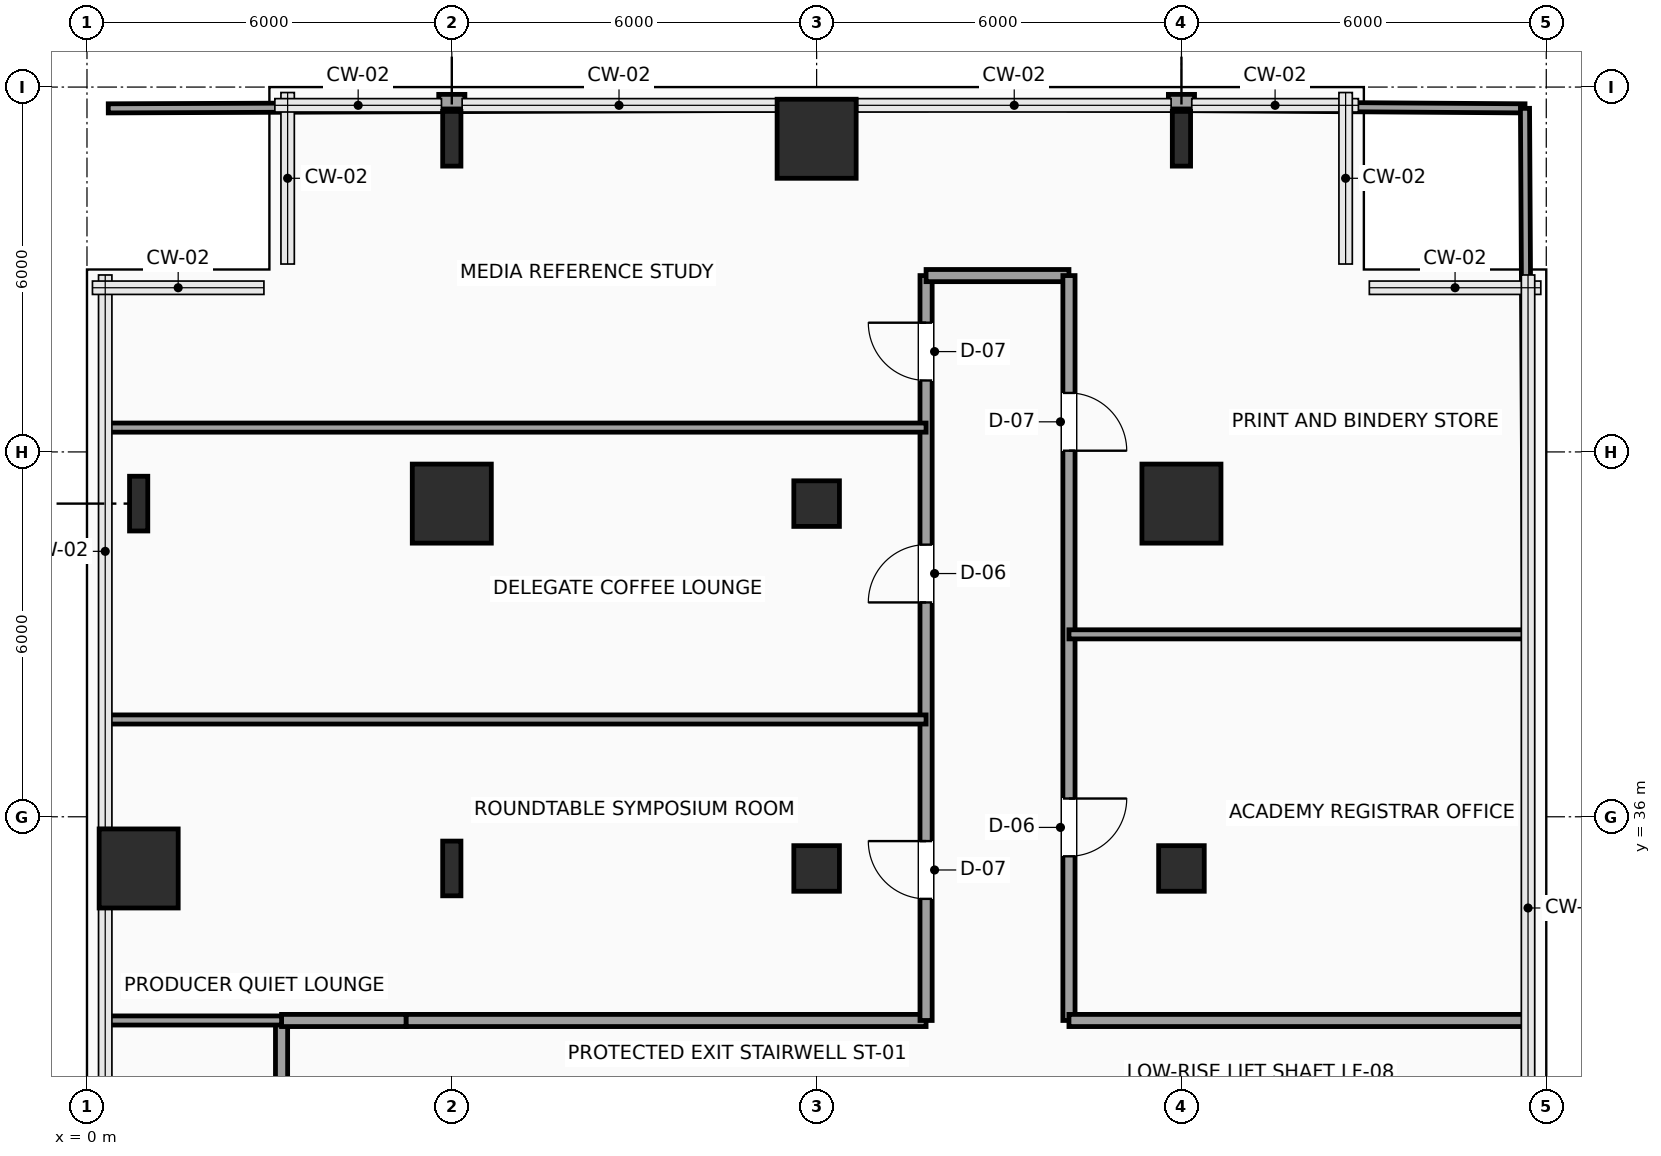
"""IFC4 building model, lengths in metres.
Left out: names, types, materials, properties, quantities, classifications, styles, units other than length and angle.
Written with IfcOpenShell. Run it as: python <this file> out.ifc"""

import sys

from ifc_helpers import new_model, si_unit, direction, frame, frame_2d, origin, origin_2d, place, context, subcontext, project, spatial, rectangle, hollow_rectangle, i_section, extrude, element, fill, save


model = new_model("IFC4")
c1 = context("Model", 3, precision=1e-05, world=origin(), true_north=direction((0.0, 1.0)))
c2 = subcontext(c1, "Body", "Model", "MODEL_VIEW")
j1 = project(units=[si_unit("LENGTHUNIT", "METRE"), si_unit("PLANEANGLEUNIT", "RADIAN")], contexts=[c1])
p1 = place(None, origin())
s1 = spatial("IfcSite", under=j1, at=p1, CompositionType="ELEMENT")
p2 = place(p1, origin())
s2 = spatial("IfcBuilding", under=s1, at=p2, CompositionType="ELEMENT")
p3 = place(p2, frame((0.0, 0.0, 63.6)))
s3 = spatial("IfcBuildingStorey", under=s2, at=p3, CompositionType="ELEMENT", Elevation=63.6)
p4 = place(p3, frame((0.85, 35.15, 0.0), z_axis=(0.0, 0.0, 1.0), x_axis=(1.0, 0.0, 0.0)))
e1 = element("IfcColumn", 1, at=p4, inside=s3, PredefinedType="COLUMN", context=c2, shape_type="SweptSolid", body=[
    extrude(rectangle(XDim=1.3, YDim=1.3, at=origin_2d()), origin(), (0.0, 0.0, 1.0), 3.9),
])
for number, where, z_axis, x_axis in (
    (2, (0.85, 41.15, 0.0), (0.0, 0.0, 1.0), (1.0, 0.0, 0.0)),
    (3, (6.0, 35.15, 0.0), (0.0, 0.0, 1.0), (1.0, 0.0, 0.0)),
):
    element("IfcColumn", number, at=place(p3, frame(where, z_axis=z_axis, x_axis=x_axis)), inside=s3, PredefinedType="COLUMN", context=c2, shape_type="SweptSolid", body=[
        extrude(i_section(OverallWidth=0.3, OverallDepth=0.9, WebThickness=0.019, FlangeThickness=0.035, FilletRadius=0.03, at=origin_2d()), origin(), (0.0, 0.0, 1.0), 3.9),
    ])
p5 = place(p3, frame((6.0, 41.15, 0.0), z_axis=(0.0, 0.0, 1.0), x_axis=(1.0, 0.0, 0.0)))
e4 = element("IfcColumn", 4, at=p5, inside=s3, PredefinedType="COLUMN", context=c2, shape_type="SweptSolid", body=[
    extrude(rectangle(XDim=1.3, YDim=1.3, at=origin_2d()), origin(), (0.0, 0.0, 1.0), 3.9),
])
p6 = place(p3, frame((6.0, 47.15, 0.0), z_axis=(0.0, 0.0, 1.0), x_axis=(1.0, 0.0, 0.0)))
e5 = element("IfcColumn", 5, at=p6, inside=s3, PredefinedType="COLUMN", context=c2, shape_type="SweptSolid", body=[
    extrude(i_section(OverallWidth=0.3, OverallDepth=0.9, WebThickness=0.019, FlangeThickness=0.035, FilletRadius=0.03, at=origin_2d()), origin(), (0.0, 0.0, 1.0), 3.9),
])
for number, where, z_axis, x_axis in (
    (6, (12.0, 35.15, 0.0), (0.0, 0.0, 1.0), (1.0, 0.0, 0.0)),
    (7, (12.0, 41.15, 0.0), (0.0, 0.0, 1.0), (1.0, 0.0, 0.0)),
):
    element("IfcColumn", number, at=place(p3, frame(where, z_axis=z_axis, x_axis=x_axis)), inside=s3, PredefinedType="COLUMN", context=c2, shape_type="SweptSolid", body=[
        extrude(hollow_rectangle(XDim=0.75, YDim=0.75, WallThickness=0.035, InnerFilletRadius=0.035, OuterFilletRadius=0.05, at=origin_2d()), origin(), (0.0, 0.0, 1.0), 3.9),
    ])
p7 = place(p3, frame((12.0, 47.15, 0.0), z_axis=(0.0, 0.0, 1.0), x_axis=(1.0, 0.0, 0.0)))
e8 = element("IfcColumn", 8, at=p7, inside=s3, PredefinedType="COLUMN", context=c2, shape_type="SweptSolid", body=[
    extrude(rectangle(XDim=1.3, YDim=1.3, at=origin_2d()), origin(), (0.0, 0.0, 1.0), 3.9),
])
p8 = place(p3, frame((18.0, 35.15, 0.0), z_axis=(0.0, 0.0, 1.0), x_axis=(1.0, 0.0, 0.0)))
e9 = element("IfcColumn", 9, at=p8, inside=s3, PredefinedType="COLUMN", context=c2, shape_type="SweptSolid", body=[
    extrude(hollow_rectangle(XDim=0.75, YDim=0.75, WallThickness=0.035, InnerFilletRadius=0.035, OuterFilletRadius=0.05, at=origin_2d()), origin(), (0.0, 0.0, 1.0), 3.9),
])
p9 = place(p3, frame((18.0, 41.15, 0.0), z_axis=(0.0, 0.0, 1.0), x_axis=(1.0, 0.0, 0.0)))
e10 = element("IfcColumn", 10, at=p9, inside=s3, PredefinedType="COLUMN", context=c2, shape_type="SweptSolid", body=[
    extrude(rectangle(XDim=1.3, YDim=1.3, at=origin_2d()), origin(), (0.0, 0.0, 1.0), 3.9),
])
p10 = place(p3, frame((18.0, 47.15, 0.0), z_axis=(0.0, 0.0, 1.0), x_axis=(1.0, 0.0, 0.0)))
e11 = element("IfcColumn", 11, at=p10, inside=s3, PredefinedType="COLUMN", context=c2, shape_type="SweptSolid", body=[
    extrude(i_section(OverallWidth=0.3, OverallDepth=0.9, WebThickness=0.019, FlangeThickness=0.035, FilletRadius=0.03, at=origin_2d()), origin(), (0.0, 0.0, 1.0), 3.9),
])
for number, where, z_axis, x_axis in (
    (12, (5.785, 47.76, 0.0), (0.0, 0.0, 1.0), (1.0, 0.0, 0.0)),
    (13, (17.785, 47.76, 0.0), (0.0, 0.0, 1.0), (1.0, 0.0, 0.0)),
):
    element("IfcWall", number, at=place(p3, frame(where, z_axis=z_axis, x_axis=x_axis)), inside=s3, PredefinedType="SOLIDWALL", context=c2, shape_type="SweptSolid", body=[
        extrude(rectangle(XDim=0.43, YDim=0.24, at=frame_2d((0.215, 0.0))), origin(), (0.0, 0.0, 1.0), 3.65),
    ])
p11 = place(p3, frame((3.2, 30.25, 0.0), z_axis=(0.0, 0.0, 1.0), x_axis=(0.0, 1.0, 0.0)))
e14 = element("IfcWall", 14, at=p11, inside=s3, PredefinedType="SOLIDWALL", context=c2, shape_type="SweptSolid", body=[
    extrude(rectangle(XDim=2.4, YDim=0.2, at=frame_2d((1.2, 0.0))), origin(), (0.0, 0.0, 1.0), 3.65),
])
p12 = place(p3, frame((3.2, 32.65, 0.0), z_axis=(0.0, 0.0, 1.0), x_axis=(1.0, 0.0, 0.0)))
e15 = element("IfcWall", 15, at=p12, inside=s3, PredefinedType="SOLIDWALL", context=c2, shape_type="SweptSolid", body=[
    extrude(rectangle(XDim=2.05, YDim=0.2, at=frame_2d((1.025, 0.0))), origin(), (0.0, 0.0, 1.0), 3.65),
])
p13 = place(p3, frame((5.25, 32.65, 0.0), z_axis=(0.0, 0.0, 1.0), x_axis=(1.0, 0.0, 0.0)))
e16 = element("IfcWall", 16, at=p13, inside=s3, PredefinedType="SOLIDWALL", context=c2, shape_type="SweptSolid", body=[
    extrude(rectangle(XDim=8.55, YDim=0.2, at=frame_2d((4.275, 0.0))), origin(), (0.0, 0.0, 1.0), 3.65),
])
p14 = place(p3, frame((13.8, 32.65, 0.0), z_axis=(0.0, 0.0, 1.0), x_axis=(0.0, 1.0, 0.0)))
e17 = element("IfcWall", 17, at=p14, inside=s3, PredefinedType="SOLIDWALL", context=c2, shape_type="SweptSolid", body=[
    extrude(rectangle(XDim=12.25, YDim=0.2, at=frame_2d((6.125, 0.0))), origin(), (0.0, 0.0, 1.0), 3.65),
])
p15 = place(p14, frame((2.0, 0.0, 0.0)))
e18 = element("IfcOpeningElement", 18, at=p15, cuts=e17, PredefinedType="OPENING", context=c2, shape_type="SweptSolid", body=[
    extrude(rectangle(XDim=0.95, YDim=2.15, at=frame_2d((0.475, 1.075))), frame((0.0, 0.11, 0.0), z_axis=(0.0, -1.0, 0.0), x_axis=(1.0, 0.0, 0.0)), (0.0, 0.0, 1.0), 0.22),
])
p16 = place(p14, frame((6.875, 0.0, 0.0)))
e19 = element("IfcOpeningElement", 19, at=p16, cuts=e17, PredefinedType="OPENING", context=c2, shape_type="SweptSolid", body=[
    extrude(rectangle(XDim=0.95, YDim=2.15, at=frame_2d((0.475, 1.075))), frame((0.0, 0.11, 0.0), z_axis=(0.0, -1.0, 0.0), x_axis=(1.0, 0.0, 0.0)), (0.0, 0.0, 1.0), 0.22),
])
p17 = place(p14, frame((10.525, 0.0, 0.0)))
e20 = element("IfcOpeningElement", 20, at=p17, cuts=e17, PredefinedType="OPENING", context=c2, shape_type="SweptSolid", body=[
    extrude(rectangle(XDim=0.95, YDim=2.15, at=frame_2d((0.475, 1.075))), frame((0.0, 0.11, 0.0), z_axis=(0.0, -1.0, 0.0), x_axis=(1.0, 0.0, 0.0)), (0.0, 0.0, 1.0), 0.22),
])
p18 = place(p3, frame((13.8, 44.9, 0.0), z_axis=(0.0, 0.0, 1.0), x_axis=(1.0, 0.0, 0.0)))
e21 = element("IfcWall", 21, at=p18, inside=s3, PredefinedType="SOLIDWALL", context=c2, shape_type="SweptSolid", body=[
    extrude(rectangle(XDim=2.35, YDim=0.2, at=frame_2d((1.175, 0.0))), origin(), (0.0, 0.0, 1.0), 3.65),
])
p19 = place(p3, frame((16.15, 44.9, 0.0), z_axis=(0.0, 0.0, 1.0), x_axis=(0.0, -1.0, 0.0)))
e22 = element("IfcWall", 22, at=p19, inside=s3, PredefinedType="SOLIDWALL", context=c2, shape_type="SweptSolid", body=[
    extrude(rectangle(XDim=12.25, YDim=0.2, at=frame_2d((6.125, 0.0))), origin(), (0.0, 0.0, 1.0), 3.65),
])
p20 = place(p19, frame((8.6, 0.0, 0.0)))
e23 = element("IfcOpeningElement", 23, at=p20, cuts=e22, PredefinedType="OPENING", context=c2, shape_type="SweptSolid", body=[
    extrude(rectangle(XDim=0.95, YDim=2.15, at=frame_2d((0.475, 1.075))), frame((0.0, 0.11, 0.0), z_axis=(0.0, -1.0, 0.0), x_axis=(1.0, 0.0, 0.0)), (0.0, 0.0, 1.0), 0.22),
])
p21 = place(p19, frame((1.93, 0.0, 0.0)))
e24 = element("IfcOpeningElement", 24, at=p21, cuts=e22, PredefinedType="OPENING", context=c2, shape_type="SweptSolid", body=[
    extrude(rectangle(XDim=0.95, YDim=2.15, at=frame_2d((0.475, 1.075))), frame((0.0, 0.11, 0.0), z_axis=(0.0, -1.0, 0.0), x_axis=(1.0, 0.0, 0.0)), (0.0, 0.0, 1.0), 0.22),
])
p22 = place(p3, frame((16.15, 32.65, 0.0), z_axis=(0.0, 0.0, 1.0), x_axis=(1.0, 0.0, 0.0)))
e25 = element("IfcWall", 25, at=p22, inside=s3, PredefinedType="SOLIDWALL", context=c2, shape_type="SweptSolid", body=[
    extrude(rectangle(XDim=7.55, YDim=0.2, at=frame_2d((3.775, 0.0))), origin(), (0.0, 0.0, 1.0), 3.65),
])
for number, where, z_axis, x_axis in (
    (26, (0.3, 37.6, 0.0), (0.0, 0.0, 1.0), (1.0, 0.0, 0.0)),
    (27, (0.3, 42.4, 0.0), (0.0, 0.0, 1.0), (1.0, 0.0, 0.0)),
):
    element("IfcWall", number, at=place(p3, frame(where, z_axis=z_axis, x_axis=x_axis)), inside=s3, PredefinedType="PARTITIONING", context=c2, shape_type="SweptSolid", body=[
        extrude(rectangle(XDim=13.5, YDim=0.15, at=frame_2d((6.75, 0.0))), origin(), (0.0, 0.0, 1.0), 3.65),
    ])
p23 = place(p3, frame((0.35, 47.65, 0.0), z_axis=(0.0, 0.0, 1.0), x_axis=(0.99999304924, 0.003728467862, 0.0)))
e28 = element("IfcWall", 28, at=p23, inside=s3, PredefinedType="PARTITIONING", context=c2, shape_type="SweptSolid", body=[
    extrude(rectangle(XDim=5.435, YDim=0.15, at=frame_2d((2.717, 0.0))), origin(), (0.0, 0.0, 1.0), 3.65),
])
p24 = place(p3, frame((6.215, 47.672, 0.0), z_axis=(0.0, 0.0, 1.0), x_axis=(0.999993149305, 0.003701532515, 0.0)))
e29 = element("IfcWall", 29, at=p24, inside=s3, PredefinedType="PARTITIONING", context=c2, shape_type="SweptSolid", body=[
    extrude(rectangle(XDim=7.585, YDim=0.15, at=frame_2d((3.792, 0.0))), origin(), (0.0, 0.0, 1.0), 3.65),
])
p25 = place(p3, frame((16.15, 39.0, 0.0), z_axis=(0.0, 0.0, 1.0), x_axis=(1.0, 0.0, 0.0)))
e30 = element("IfcWall", 30, at=p25, inside=s3, PredefinedType="PARTITIONING", context=c2, shape_type="SweptSolid", body=[
    extrude(rectangle(XDim=7.55, YDim=0.15, at=frame_2d((3.775, 0.0))), origin(), (0.0, 0.0, 1.0), 3.65),
])
p26 = place(p3, frame((16.15, 47.7, 0.0), z_axis=(0.0, 0.0, 1.0), x_axis=(0.999978417552, -0.006569964219, 0.0)))
e31 = element("IfcWall", 31, at=p26, inside=s3, PredefinedType="PARTITIONING", context=c2, shape_type="SweptSolid", body=[
    extrude(rectangle(XDim=1.635, YDim=0.15, at=frame_2d((0.817, 0.0))), origin(), (0.0, 0.0, 1.0), 3.65),
])
p27 = place(p3, frame((18.215, 47.686, 0.0), z_axis=(0.0, 0.0, 1.0), x_axis=(0.999977600485, -0.006693170229, 0.0)))
e32 = element("IfcWall", 32, at=p27, inside=s3, PredefinedType="PARTITIONING", context=c2, shape_type="SweptSolid", body=[
    extrude(rectangle(XDim=5.435, YDim=0.15, at=frame_2d((2.717, 0.0))), origin(), (0.0, 0.0, 1.0), 3.65),
])
p28 = place(p3, frame((23.7, 39.0, 0.0), z_axis=(0.0, 0.0, 1.0), x_axis=(-0.005785960162, 0.999983261192, 0.0)))
e33 = element("IfcWall", 33, at=p28, inside=s3, PredefinedType="PARTITIONING", context=c2, shape_type="SweptSolid", body=[
    extrude(rectangle(XDim=8.65, YDim=0.15, at=frame_2d((4.325, 0.0))), origin(), (0.0, 0.0, 1.0), 3.65),
])
p29 = place(p3, frame((0.3, 32.65, 0.0), z_axis=(0.0, 0.0, 1.0), x_axis=(1.0, 0.0, 0.0)))
e34 = element("IfcWall", 34, at=p29, inside=s3, PredefinedType="PARTITIONING", context=c2, shape_type="SweptSolid", body=[
    extrude(rectangle(XDim=2.9, YDim=0.15, at=frame_2d((1.45, 0.0))), origin(), (0.0, 0.0, 1.0), 3.65),
])
p30 = place(p15, origin())
e35 = element("IfcDoor", 35, at=p30, inside=s3, OperationType="SINGLE_SWING_RIGHT", PredefinedType="DOOR", context=c2, shape_type="SweptSolid", body=[
    extrude(rectangle(XDim=0.95, YDim=2.15, at=frame_2d((0.475, 1.075))), frame((0.0, 0.025, 0.0), z_axis=(0.0, -1.0, 0.0), x_axis=(1.0, 0.0, 0.0)), (0.0, 0.0, 1.0), 0.05),
])
fill(e18, e35)
p31 = place(p16, origin())
e36 = element("IfcDoor", 36, at=p31, inside=s3, OperationType="SINGLE_SWING_LEFT", PredefinedType="DOOR", context=c2, shape_type="SweptSolid", body=[
    extrude(rectangle(XDim=0.95, YDim=2.15, at=frame_2d((0.475, 1.075))), frame((0.0, 0.025, 0.0), z_axis=(0.0, -1.0, 0.0), x_axis=(1.0, 0.0, 0.0)), (0.0, 0.0, 1.0), 0.05),
])
fill(e19, e36)
p32 = place(p17, origin())
e37 = element("IfcDoor", 37, at=p32, inside=s3, OperationType="SINGLE_SWING_RIGHT", PredefinedType="DOOR", context=c2, shape_type="SweptSolid", body=[
    extrude(rectangle(XDim=0.95, YDim=2.15, at=frame_2d((0.475, 1.075))), frame((0.0, 0.025, 0.0), z_axis=(0.0, -1.0, 0.0), x_axis=(1.0, 0.0, 0.0)), (0.0, 0.0, 1.0), 0.05),
])
fill(e20, e37)
p33 = place(p20, origin())
e38 = element("IfcDoor", 38, at=p33, inside=s3, OperationType="SINGLE_SWING_LEFT", PredefinedType="DOOR", context=c2, shape_type="SweptSolid", body=[
    extrude(rectangle(XDim=0.95, YDim=2.15, at=frame_2d((0.475, 1.075))), frame((0.0, 0.025, 0.0), z_axis=(0.0, -1.0, 0.0), x_axis=(1.0, 0.0, 0.0)), (0.0, 0.0, 1.0), 0.05),
])
fill(e23, e38)
p34 = place(p21, origin())
e39 = element("IfcDoor", 39, at=p34, inside=s3, OperationType="SINGLE_SWING_RIGHT", PredefinedType="DOOR", context=c2, shape_type="SweptSolid", body=[
    extrude(rectangle(XDim=0.95, YDim=2.15, at=frame_2d((0.475, 1.075))), frame((0.0, 0.025, 0.0), z_axis=(0.0, -1.0, 0.0), x_axis=(1.0, 0.0, 0.0)), (0.0, 0.0, 1.0), 0.05),
])
fill(e24, e39)
save(model, sys.argv[1])
